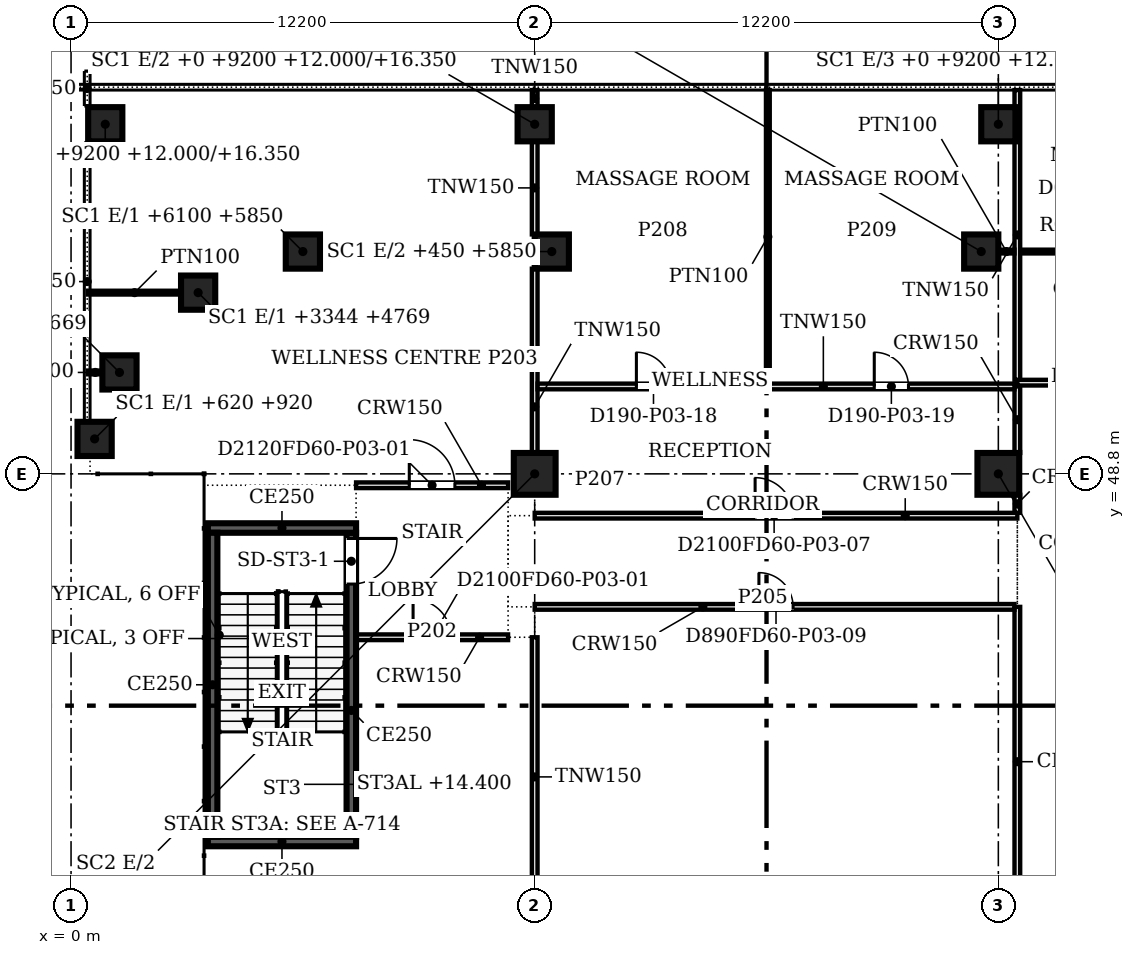
"""IFC4 building model, lengths in metres.
Left out: names, types, materials, properties, quantities, classifications, styles, units other than length and angle.
Written with IfcOpenShell. Run it as: python <this file> out.ifc"""

import sys

from ifc_helpers import new_model, si_unit, direction, frame, frame_2d, origin, origin_2d, place, context, subcontext, project, spatial, polyline, rectangle, outline, extrude, faceted_brep, source, transform, mapped, element, fill, save


model = new_model("IFC4")
c1 = context("Model", 3, precision=1e-05, world=origin(), true_north=direction((0.0, 1.0)))
c2 = subcontext(c1, "Body", "Model", "MODEL_VIEW")
j1 = project(units=[si_unit("LENGTHUNIT", "METRE"), si_unit("PLANEANGLEUNIT", "RADIAN")], contexts=[c1])
p1 = place(None, origin())
s1 = spatial("IfcSite", under=j1, at=p1, CompositionType="ELEMENT")
p2 = place(p1, origin())
s2 = spatial("IfcBuilding", under=s1, at=p2, CompositionType="ELEMENT")
p3 = place(p2, frame((0.0, 0.0, 12.0)))
s3 = spatial("IfcBuildingStorey", under=s2, at=p3, CompositionType="ELEMENT", Elevation=12.0)
for number, where, z_axis, x_axis in (
    (1, (12.65, 54.65, 0.0), (0.0, 0.0, 1.0), (1.0, 0.0, 0.0)),
    (2, (23.95, 54.65, 0.0), (0.0, 0.0, 1.0), (1.0, 0.0, 0.0)),
    (3, (6.1, 54.65, 0.0), (0.0, 0.0, 1.0), (1.0, 0.0, 0.0)),
    (4, (3.344, 53.569, 0.0), (0.0, 0.0, 1.0), (1.0, 0.0, 0.0)),
    (5, (1.274, 51.469, 0.0), (0.0, 0.0, 1.0), (1.0, 0.0, 0.0)),
):
    element("IfcColumn", number, at=place(p3, frame(where, z_axis=z_axis, x_axis=x_axis)), inside=s3, PredefinedType="COLUMN", context=c2, shape_type="SweptSolid", body=[
        extrude(rectangle(XDim=0.9, YDim=0.9, at=origin_2d()), origin(), (0.0, 0.0, 1.0), 4.6),
    ])
for number, where, z_axis, x_axis in (
    (6, (12.2, 48.8, 0.0), (0.0, 0.0, 1.0), (1.0, 0.0, 0.0)),
    (7, (24.4, 48.8, 0.0), (0.0, 0.0, 1.0), (1.0, 0.0, 0.0)),
):
    element("IfcColumn", number, at=place(p3, frame(where, z_axis=z_axis, x_axis=x_axis)), inside=s3, PredefinedType="COLUMN", context=c2, shape_type="SweptSolid", body=[
        extrude(rectangle(XDim=1.1, YDim=1.1, at=origin_2d()), origin(), (0.0, 0.0, 1.0), 4.6),
    ])
for number, where, z_axis, x_axis in (
    (8, (12.2, 58.0, 0.0), (0.0, 0.0, 1.0), (1.0, 0.0, 0.0)),
    (9, (24.4, 58.0, 0.0), (0.0, 0.0, 1.0), (1.0, 0.0, 0.0)),
    (10, (0.9, 58.0, 0.0), (0.0, 0.0, 1.0), (1.0, 0.0, 0.0)),
):
    element("IfcColumn", number, at=place(p3, frame(where, z_axis=z_axis, x_axis=x_axis)), inside=s3, PredefinedType="COLUMN", context=c2, shape_type="SweptSolid", body=[
        extrude(rectangle(XDim=0.9, YDim=0.9, at=origin_2d()), origin(), (0.0, 0.0, 1.0), 4.35),
    ])
p4 = place(p3, frame((0.62, 49.72, 0.0), z_axis=(0.0, 0.0, 1.0), x_axis=(1.0, 0.0, 0.0)))
e11 = element("IfcColumn", 11, at=p4, inside=s3, PredefinedType="COLUMN", context=c2, shape_type="SweptSolid", body=[
    extrude(rectangle(XDim=0.9, YDim=0.9, at=origin_2d()), origin(), (0.0, 0.0, 1.0), 4.6),
])
m1 = source(origin(), c2, "Body", "Brep", [
    faceted_brep([(0.047, -0.25, 0.0), (6.1, -0.25, 8.4), (0.0, -0.25, 8.4), (0.0, -0.25, 0.066), (0.093, 0.25, 8.4), (6.1, 0.25, 8.4), (0.093, 0.25, 0.065), (0.047, 0.0, 0.0)], [[[0, 1, 2, 3]], [[4, 5, 6]], [[6, 5, 1, 0, 7]], [[5, 4, 2, 1]], [[7, 0, 3]], [[6, 7, 3, 2, 4]]]),
])
p5 = place(p3, frame((0.25, 48.8, -3.6), z_axis=(0.0, 0.0, 1.0), x_axis=(0.0, -1.0, 0.0)))
e12 = element("IfcWall", 12, at=p5, inside=s3, PredefinedType="SOLIDWALL", context=c2, shape_type="MappedRepresentation", body=[
    mapped(m1, transform((0.0, 0.0, 0.0), scale=1.0)),
])
m2 = source(origin(), c2, "Body", "SweptSolid", [
    extrude(outline(polyline([(0.247, 0.705), (5.612, 8.15), (0.247, 8.15), (0.247, 0.705)])), frame((0.0, 0.26, 0.0), z_axis=(0.0, -1.0, 0.0), x_axis=(1.0, 0.0, 0.0)), (0.0, 0.0, 1.0), 0.52),
])
p6 = place(p5, origin())
e13 = element("IfcOpeningElement", 13, at=p6, cuts=e12, PredefinedType="OPENING", context=c2, shape_type="MappedRepresentation", body=[
    mapped(m2, transform((0.0, 0.0, 0.0), scale=1.0)),
])
m3 = source(origin(), c2, "Body", "SweptSolid", [
    extrude(outline(polyline([(6.1, 0.0), (12.2, 8.4), (0.0, 8.4), (6.1, 0.0)])), frame((0.0, 0.25, 0.0), z_axis=(0.0, -1.0, 0.0), x_axis=(1.0, 0.0, 0.0)), (0.0, 0.0, 1.0), 0.5),
])
p7 = place(p3, frame((0.25, 42.7, -3.6), z_axis=(0.0, 0.0, 1.0), x_axis=(0.0, -1.0, 0.0)))
e14 = element("IfcWall", 14, at=p7, inside=s3, PredefinedType="SOLIDWALL", context=c2, shape_type="MappedRepresentation", body=[
    mapped(m3, transform((0.0, 0.0, 0.0), scale=1.0)),
])
m4 = source(origin(), c2, "Body", "SweptSolid", [
    extrude(outline(polyline([(6.1, 0.426), (11.709, 8.15), (0.49, 8.15), (6.1, 0.426)])), frame((0.0, 0.26, 0.0), z_axis=(0.0, -1.0, 0.0), x_axis=(1.0, 0.0, 0.0)), (0.0, 0.0, 1.0), 0.52),
])
p8 = place(p7, origin())
e15 = element("IfcOpeningElement", 15, at=p8, cuts=e14, PredefinedType="OPENING", context=c2, shape_type="MappedRepresentation", body=[
    mapped(m4, transform((0.0, 0.0, 0.0), scale=1.0)),
])
m5 = source(origin(), c2, "Body", "Brep", [
    faceted_brep([(6.1, -0.25, 0.0), (0.0, -0.25, 8.4), (0.0, -0.25, 7.549), (5.482, -0.25, 0.0), (6.1, -0.25, 0.0), (5.482, 0.25, 0.0), (0.0, 0.25, 7.549), (0.0, 0.25, 8.4), (6.1, 0.25, 0.0), (6.1, 0.25, 0.0)], [[[0, 1, 2, 3, 4]], [[5, 6, 7, 8, 9]], [[8, 7, 1, 0]], [[7, 6, 2, 1]], [[6, 5, 3, 2]], [[5, 9, 4, 3]], [[4, 9, 8, 0]]]),
])
p9 = place(p3, frame((0.25, 42.7, -3.6), z_axis=(0.0, 0.0, 1.0), x_axis=(0.0, -1.0, 0.0)))
e16 = element("IfcWall", 16, at=p9, inside=s3, PredefinedType="SOLIDWALL", context=c2, shape_type="MappedRepresentation", body=[
    mapped(m5, transform((0.0, 0.0, 0.0), scale=1.0)),
])
m6 = source(origin(), c2, "Body", "Brep", [
    faceted_brep([(6.053, -0.25, 8.4), (0.0, -0.25, 0.0), (0.613, -0.25, 0.0), (6.053, -0.25, 7.549), (6.053, 0.25, 7.549), (0.613, 0.25, 0.0), (0.047, 0.25, 0.0), (0.047, 0.25, 0.065), (6.053, 0.25, 8.4), (0.0, 0.0, 0.0)], [[[0, 1, 2, 3]], [[4, 5, 6, 7, 8]], [[8, 7, 9, 1, 0]], [[6, 5, 2, 1, 9]], [[5, 4, 3, 2]], [[6, 9, 7]], [[3, 4, 8, 0]]]),
])
p10 = place(p3, frame((0.25, 48.753, -3.6), z_axis=(0.0, 0.0, 1.0), x_axis=(0.0, -1.0, 0.0)))
e17 = element("IfcWall", 17, at=p10, inside=s3, PredefinedType="SOLIDWALL", context=c2, shape_type="MappedRepresentation", body=[
    mapped(m6, transform((0.0, 0.0, 0.0), scale=1.0)),
])
p11 = place(p3, frame((7.5, 39.125, 0.0), z_axis=(0.0, 0.0, 1.0), x_axis=(-1.0, 0.0, 0.0)))
e18 = element("IfcWall", 18, at=p11, inside=s3, PredefinedType="SOLIDWALL", context=c2, shape_type="SweptSolid", body=[
    extrude(rectangle(XDim=3.9, YDim=0.25, at=frame_2d((1.95, 0.0))), origin(), (0.0, 0.0, 1.0), 4.8),
])
p12 = place(p3, frame((3.725, 39.25, 0.0), z_axis=(0.0, 0.0, 1.0), x_axis=(0.0, 1.0, 0.0)))
e19 = element("IfcWall", 19, at=p12, inside=s3, PredefinedType="SOLIDWALL", context=c2, shape_type="SweptSolid", body=[
    extrude(rectangle(XDim=8.0, YDim=0.25, at=frame_2d((4.0, 0.0))), origin(), (0.0, 0.0, 1.0), 4.8),
])
p13 = place(p3, frame((3.6, 47.375, 0.0), z_axis=(0.0, 0.0, 1.0), x_axis=(1.0, 0.0, 0.0)))
e20 = element("IfcWall", 20, at=p13, inside=s3, PredefinedType="SOLIDWALL", context=c2, shape_type="SweptSolid", body=[
    extrude(rectangle(XDim=3.9, YDim=0.25, at=frame_2d((1.95, 0.0))), origin(), (0.0, 0.0, 1.0), 4.8),
])
p14 = place(p3, frame((7.375, 47.25, 0.0), z_axis=(0.0, 0.0, 1.0), x_axis=(0.0, -1.0, 0.0)))
e21 = element("IfcWall", 21, at=p14, inside=s3, PredefinedType="SOLIDWALL", context=c2, shape_type="SweptSolid", body=[
    extrude(rectangle(XDim=8.0, YDim=0.25, at=frame_2d((4.0, 0.0))), origin(), (0.0, 0.0, 1.0), 4.8),
])
m7 = source(origin(), c2, "Body", "SweptSolid", [
    extrude(rectangle(XDim=1.2, YDim=2.1, at=frame_2d((0.6, 1.05))), frame((0.0, 0.135, 0.0), z_axis=(0.0, -1.0, 0.0), x_axis=(1.0, 0.0, 0.0)), (0.0, 0.0, 1.0), 0.27),
])
p15 = place(p14, frame((0.15, 0.0, 0.0)))
e22 = element("IfcOpeningElement", 22, at=p15, cuts=e21, PredefinedType="OPENING", context=c2, shape_type="MappedRepresentation", body=[
    mapped(m7, transform((0.0, 0.0, 0.0), scale=1.0)),
])
p16 = place(p3, frame((12.2, 37.151, 0.0), z_axis=(0.0, 0.0, 1.0), x_axis=(0.0, 1.0, 0.0)))
e23 = element("IfcWall", 23, at=p16, inside=s3, PredefinedType="PARTITIONING", context=c2, shape_type="SweptSolid", body=[
    extrude(rectangle(XDim=7.349, YDim=0.15, at=frame_2d((3.675, 0.0))), origin(), (0.0, 0.0, 1.0), 3.672),
])
p17 = place(p3, frame((24.9, 37.151, 0.0), z_axis=(0.0, 0.0, 1.0), x_axis=(0.0, 1.0, 0.0)))
e24 = element("IfcWall", 24, at=p17, inside=s3, PredefinedType="PARTITIONING", context=c2, shape_type="SweptSolid", body=[
    extrude(rectangle(XDim=8.149, YDim=0.15, at=frame_2d((4.075, 0.0))), origin(), (0.0, 0.0, 1.0), 3.672),
])
p18 = place(p3, frame((11.5, 44.5, 0.0), z_axis=(0.0, 0.0, 1.0), x_axis=(-1.0, 0.0, 0.0)))
e25 = element("IfcWall", 25, at=p18, inside=s3, PredefinedType="PARTITIONING", context=c2, shape_type="SweptSolid", body=[
    extrude(rectangle(XDim=4.0, YDim=0.15, at=frame_2d((2.0, 0.0))), origin(), (0.0, 0.0, 1.0), 3.672),
])
m8 = source(origin(), c2, "Body", "SweptSolid", [
    extrude(rectangle(XDim=1.0, YDim=2.1, at=frame_2d((0.5, 1.05))), frame((0.0, 0.085, 0.0), z_axis=(0.0, -1.0, 0.0), x_axis=(1.0, 0.0, 0.0)), (0.0, 0.0, 1.0), 0.17),
])
p19 = place(p18, frame((1.5, 0.0, 0.0)))
e26 = element("IfcOpeningElement", 26, at=p19, cuts=e25, PredefinedType="OPENING", context=c2, shape_type="MappedRepresentation", body=[
    mapped(m8, transform((0.0, 0.0, 0.0), scale=1.0)),
])
p20 = place(p3, frame((24.824, 45.3, 0.0), z_axis=(0.0, 0.0, 1.0), x_axis=(-1.0, 0.0, 0.0)))
e27 = element("IfcWall", 27, at=p20, inside=s3, PredefinedType="PARTITIONING", context=c2, shape_type="SweptSolid", body=[
    extrude(rectangle(XDim=12.624, YDim=0.15, at=frame_2d((6.312, 0.0))), origin(), (0.0, 0.0, 1.0), 3.672),
])
m9 = source(origin(), c2, "Body", "SweptSolid", [
    extrude(rectangle(XDim=0.9, YDim=2.1, at=frame_2d((0.45, 1.05))), frame((0.0, 0.085, 0.0), z_axis=(0.0, -1.0, 0.0), x_axis=(1.0, 0.0, 0.0)), (0.0, 0.0, 1.0), 0.17),
])
p21 = place(p20, frame((5.824, 0.0, 0.0)))
e28 = element("IfcOpeningElement", 28, at=p21, cuts=e27, PredefinedType="OPENING", context=c2, shape_type="MappedRepresentation", body=[
    mapped(m9, transform((0.0, 0.0, 0.0), scale=1.0)),
])
p22 = place(p3, frame((12.2, 47.7, 0.0), z_axis=(0.0, 0.0, 1.0), x_axis=(1.0, 0.0, 0.0)))
e29 = element("IfcWall", 29, at=p22, inside=s3, PredefinedType="PARTITIONING", context=c2, shape_type="SweptSolid", body=[
    extrude(rectangle(XDim=12.7, YDim=0.15, at=frame_2d((6.35, 0.0))), origin(), (0.0, 0.0, 1.0), 3.672),
])
p23 = place(p22, frame((5.8, 0.0, 0.0)))
e30 = element("IfcOpeningElement", 30, at=p23, cuts=e29, PredefinedType="OPENING", context=c2, shape_type="MappedRepresentation", body=[
    mapped(m8, transform((0.0, 0.0, 0.0), scale=1.0)),
])
p24 = place(p3, frame((24.9, 47.776, 0.0), z_axis=(0.0, 0.0, 1.0), x_axis=(0.0, 1.0, 0.0)))
e31 = element("IfcWall", 31, at=p24, inside=s3, PredefinedType="PARTITIONING", context=c2, shape_type="SweptSolid", body=[
    extrude(rectangle(XDim=0.473, YDim=0.15, at=frame_2d((0.237, 0.0))), origin(), (0.0, 0.0, 1.0), 3.672),
])
p25 = place(p3, frame((7.5, 48.5, 0.0), z_axis=(0.0, 0.0, 1.0), x_axis=(1.0, 0.0, 0.0)))
e32 = element("IfcWall", 32, at=p25, inside=s3, PredefinedType="PARTITIONING", context=c2, shape_type="SweptSolid", body=[
    extrude(rectangle(XDim=4.0, YDim=0.15, at=frame_2d((2.0, 0.0))), origin(), (0.0, 0.0, 1.0), 3.672),
])
m10 = source(origin(), c2, "Body", "SweptSolid", [
    extrude(rectangle(XDim=1.2, YDim=2.1, at=frame_2d((0.6, 1.05))), frame((0.0, 0.085, 0.0), z_axis=(0.0, -1.0, 0.0), x_axis=(1.0, 0.0, 0.0)), (0.0, 0.0, 1.0), 0.17),
])
p26 = place(p25, frame((1.4, 0.0, 0.0)))
e33 = element("IfcOpeningElement", 33, at=p26, cuts=e32, PredefinedType="OPENING", context=c2, shape_type="MappedRepresentation", body=[
    mapped(m10, transform((0.0, 0.0, 0.0), scale=1.0)),
])
p27 = place(p3, frame((12.2, 49.351, 0.0), z_axis=(0.0, 0.0, 1.0), x_axis=(0.0, 1.0, 0.0)))
e34 = element("IfcWall", 34, at=p27, inside=s3, PredefinedType="PARTITIONING", context=c2, shape_type="SweptSolid", body=[
    extrude(rectangle(XDim=4.848, YDim=0.15, at=frame_2d((2.424, 0.0))), origin(), (0.0, 0.0, 1.0), 3.672),
])
p28 = place(p3, frame((24.9, 49.351, 0.0), z_axis=(0.0, 0.0, 1.0), x_axis=(0.0, 1.0, 0.0)))
e35 = element("IfcWall", 35, at=p28, inside=s3, PredefinedType="PARTITIONING", context=c2, shape_type="SweptSolid", body=[
    extrude(rectangle(XDim=1.749, YDim=0.15, at=frame_2d((0.875, 0.0))), origin(), (0.0, 0.0, 1.0), 3.672),
])
p29 = place(p3, frame((12.276, 51.1, 0.0), z_axis=(0.0, 0.0, 1.0), x_axis=(1.0, 0.0, 0.0)))
e36 = element("IfcWall", 36, at=p29, inside=s3, PredefinedType="PARTITIONING", context=c2, shape_type="SweptSolid", body=[
    extrude(rectangle(XDim=12.548, YDim=0.15, at=frame_2d((6.274, 0.0))), origin(), (0.0, 0.0, 1.0), 3.672),
])
p30 = place(p29, frame((2.6, 0.0, 0.0)))
e37 = element("IfcOpeningElement", 37, at=p30, cuts=e36, PredefinedType="OPENING", context=c2, shape_type="MappedRepresentation", body=[
    mapped(m9, transform((0.0, 0.0, 0.0), scale=1.0)),
])
p31 = place(p29, frame((8.859, 0.0, 0.0)))
e38 = element("IfcOpeningElement", 38, at=p31, cuts=e36, PredefinedType="OPENING", context=c2, shape_type="MappedRepresentation", body=[
    mapped(m9, transform((0.0, 0.0, 0.0), scale=1.0)),
])
p32 = place(p3, frame((18.335, 51.176, 0.0), z_axis=(0.0, 0.0, 1.0), x_axis=(0.0, 1.0, 0.0)))
e39 = element("IfcWall", 39, at=p32, inside=s3, PredefinedType="PARTITIONING", context=c2, shape_type="SweptSolid", body=[
    extrude(rectangle(XDim=7.724, YDim=0.1, at=frame_2d((3.862, 0.0))), origin(), (0.0, 0.0, 1.0), 3.672),
])
p33 = place(p3, frame((24.9, 51.2, 0.0), z_axis=(0.0, 0.0, 1.0), x_axis=(1.0, 0.0, 0.0)))
e40 = element("IfcWall", 40, at=p33, inside=s3, PredefinedType="PARTITIONING", context=c2, shape_type="SweptSolid", body=[
    extrude(rectangle(XDim=32.324, YDim=0.15, at=frame_2d((16.162, 0.0))), origin(), (0.0, 0.0, 1.0), 3.672),
])
p34 = place(p33, frame((29.201, 0.0, 0.0)))
e41 = element("IfcOpeningElement", 41, at=p34, cuts=e40, PredefinedType="OPENING", context=c2, shape_type="MappedRepresentation", body=[
    mapped(m9, transform((0.0, 0.0, 0.0), scale=1.0)),
])
p35 = place(p33, frame((12.901, 0.0, 0.0)))
e42 = element("IfcOpeningElement", 42, at=p35, cuts=e40, PredefinedType="OPENING", context=c2, shape_type="MappedRepresentation", body=[
    mapped(m9, transform((0.0, 0.0, 0.0), scale=1.0)),
])
p36 = place(p33, frame((4.0, 0.0, 0.0)))
e43 = element("IfcOpeningElement", 43, at=p36, cuts=e40, PredefinedType="OPENING", context=c2, shape_type="MappedRepresentation", body=[
    mapped(m9, transform((0.0, 0.0, 0.0), scale=1.0)),
])
p37 = place(p33, frame((21.9, 0.0, 0.0)))
e44 = element("IfcOpeningElement", 44, at=p37, cuts=e40, PredefinedType="OPENING", context=c2, shape_type="MappedRepresentation", body=[
    mapped(m9, transform((0.0, 0.0, 0.0), scale=1.0)),
])
p38 = place(p3, frame((24.9, 51.276, 0.0), z_axis=(0.0, 0.0, 1.0), x_axis=(0.0, 1.0, 0.0)))
e45 = element("IfcWall", 45, at=p38, inside=s3, PredefinedType="PARTITIONING", context=c2, shape_type="SweptSolid", body=[
    extrude(rectangle(XDim=7.624, YDim=0.15, at=frame_2d((3.812, 0.0))), origin(), (0.0, 0.0, 1.0), 3.672),
])
p39 = place(p3, frame((0.824, 51.469, 0.0), z_axis=(0.0, 0.0, 1.0), x_axis=(-1.0, 0.0, 0.0)))
e46 = element("IfcWall", 46, at=p39, inside=s3, PredefinedType="PARTITIONING", context=c2, shape_type="SweptSolid", body=[
    extrude(rectangle(XDim=0.374, YDim=0.1, at=frame_2d((0.187, 0.0))), origin(), (0.0, 0.0, 1.0), 3.672),
])
p40 = place(p3, frame((2.894, 53.569, 0.0), z_axis=(0.0, 0.0, 1.0), x_axis=(-1.0, 0.0, 0.0)))
e47 = element("IfcWall", 47, at=p40, inside=s3, PredefinedType="PARTITIONING", context=c2, shape_type="SweptSolid", body=[
    extrude(rectangle(XDim=2.444, YDim=0.1, at=frame_2d((1.222, 0.0))), origin(), (0.0, 0.0, 1.0), 3.672),
])
p41 = place(p3, frame((24.4, 54.65, 0.0), z_axis=(0.0, 0.0, 1.0), x_axis=(1.0, 0.0, 0.0)))
e48 = element("IfcWall", 48, at=p41, inside=s3, PredefinedType="PARTITIONING", context=c2, shape_type="SweptSolid", body=[
    extrude(rectangle(XDim=0.425, YDim=0.1, at=frame_2d((0.212, 0.0))), origin(), (0.0, 0.0, 1.0), 3.672),
])
p42 = place(p3, frame((24.976, 54.65, 0.0), z_axis=(0.0, 0.0, 1.0), x_axis=(1.0, 0.0, 0.0)))
e49 = element("IfcWall", 49, at=p42, inside=s3, PredefinedType="PARTITIONING", context=c2, shape_type="SweptSolid", body=[
    extrude(rectangle(XDim=4.221, YDim=0.1, at=frame_2d((2.11, 0.0))), origin(), (0.0, 0.0, 1.0), 3.672),
])
m11 = source(origin(), c2, "Body", "SweptSolid", [
    extrude(rectangle(XDim=0.9, YDim=2.1, at=frame_2d((0.45, 1.05))), frame((0.0, 0.06, 0.0), z_axis=(0.0, -1.0, 0.0), x_axis=(1.0, 0.0, 0.0)), (0.0, 0.0, 1.0), 0.12),
])
p43 = place(p42, frame((1.7, 0.0, 0.0)))
e50 = element("IfcOpeningElement", 50, at=p43, cuts=e49, PredefinedType="OPENING", context=c2, shape_type="MappedRepresentation", body=[
    mapped(m11, transform((0.0, 0.0, 0.0), scale=1.0)),
])
p44 = place(p3, frame((12.2, 55.101, 0.0), z_axis=(0.0, 0.0, 1.0), x_axis=(0.0, 1.0, 0.0)))
e51 = element("IfcWall", 51, at=p44, inside=s3, PredefinedType="PARTITIONING", context=c2, shape_type="SweptSolid", body=[
    extrude(rectangle(XDim=2.448, YDim=0.15, at=frame_2d((1.224, 0.0))), origin(), (0.0, 0.0, 1.0), 3.672),
])
p45 = place(p3, frame((12.2, 58.451, 0.0), z_axis=(0.0, 0.0, 1.0), x_axis=(0.0, 1.0, 0.0)))
e52 = element("IfcWall", 52, at=p45, inside=s3, PredefinedType="PARTITIONING", context=c2, shape_type="SweptSolid", body=[
    extrude(rectangle(XDim=0.449, YDim=0.15, at=frame_2d((0.225, 0.0))), origin(), (0.0, 0.0, 1.0), 3.672),
])
m12 = source(origin(), c2, "Body", "SweptSolid", [
    extrude(rectangle(XDim=1.2, YDim=2.1, at=frame_2d((0.6, 1.05))), frame((0.0, 0.025, 0.0), z_axis=(0.0, -1.0, 0.0), x_axis=(1.0, 0.0, 0.0)), (0.0, 0.0, 1.0), 0.05),
])
p46 = place(p15, origin())
e53 = element("IfcDoor", 53, at=p46, inside=s3, OperationType="SINGLE_SWING_LEFT", PredefinedType="DOOR", context=c2, shape_type="MappedRepresentation", body=[
    mapped(m12, transform((0.0, 0.0, 0.0), scale=1.0)),
])
fill(e22, e53)
p47 = place(p26, origin())
e54 = element("IfcDoor", 54, at=p47, inside=s3, OperationType="SINGLE_SWING_LEFT", PredefinedType="DOOR", context=c2, shape_type="MappedRepresentation", body=[
    mapped(m12, transform((0.0, 0.0, 0.0), scale=1.0)),
])
fill(e33, e54)
m13 = source(origin(), c2, "Body", "SweptSolid", [
    extrude(rectangle(XDim=1.0, YDim=2.1, at=frame_2d((0.5, 1.05))), frame((0.0, 0.025, 0.0), z_axis=(0.0, -1.0, 0.0), x_axis=(1.0, 0.0, 0.0)), (0.0, 0.0, 1.0), 0.05),
])
p48 = place(p19, origin())
e55 = element("IfcDoor", 55, at=p48, inside=s3, OperationType="SINGLE_SWING_RIGHT", PredefinedType="DOOR", context=c2, shape_type="MappedRepresentation", body=[
    mapped(m13, transform((0.0, 0.0, 0.0), scale=1.0)),
])
fill(e26, e55)
m14 = source(origin(), c2, "Body", "SweptSolid", [
    extrude(rectangle(XDim=0.9, YDim=2.1, at=frame_2d((0.45, 1.05))), frame((0.0, 0.025, 0.0), z_axis=(0.0, -1.0, 0.0), x_axis=(1.0, 0.0, 0.0)), (0.0, 0.0, 1.0), 0.05),
])
p49 = place(p30, origin())
e56 = element("IfcDoor", 56, at=p49, inside=s3, OperationType="SINGLE_SWING_LEFT", PredefinedType="DOOR", context=c2, shape_type="MappedRepresentation", body=[
    mapped(m14, transform((0.0, 0.0, 0.0), scale=1.0)),
])
fill(e37, e56)
p50 = place(p31, origin())
e57 = element("IfcDoor", 57, at=p50, inside=s3, OperationType="SINGLE_SWING_LEFT", PredefinedType="DOOR", context=c2, shape_type="MappedRepresentation", body=[
    mapped(m14, transform((0.0, 0.0, 0.0), scale=1.0)),
])
fill(e38, e57)
p51 = place(p21, origin())
e58 = element("IfcDoor", 58, at=p51, inside=s3, OperationType="SINGLE_SWING_RIGHT", PredefinedType="DOOR", context=c2, shape_type="MappedRepresentation", body=[
    mapped(m14, transform((0.0, 0.0, 0.0), scale=1.0)),
])
fill(e28, e58)
p52 = place(p23, origin())
e59 = element("IfcDoor", 59, at=p52, inside=s3, OperationType="SINGLE_SWING_LEFT", PredefinedType="DOOR", context=c2, shape_type="MappedRepresentation", body=[
    mapped(m13, transform((0.0, 0.0, 0.0), scale=1.0)),
])
fill(e30, e59)
save(model, sys.argv[1])
